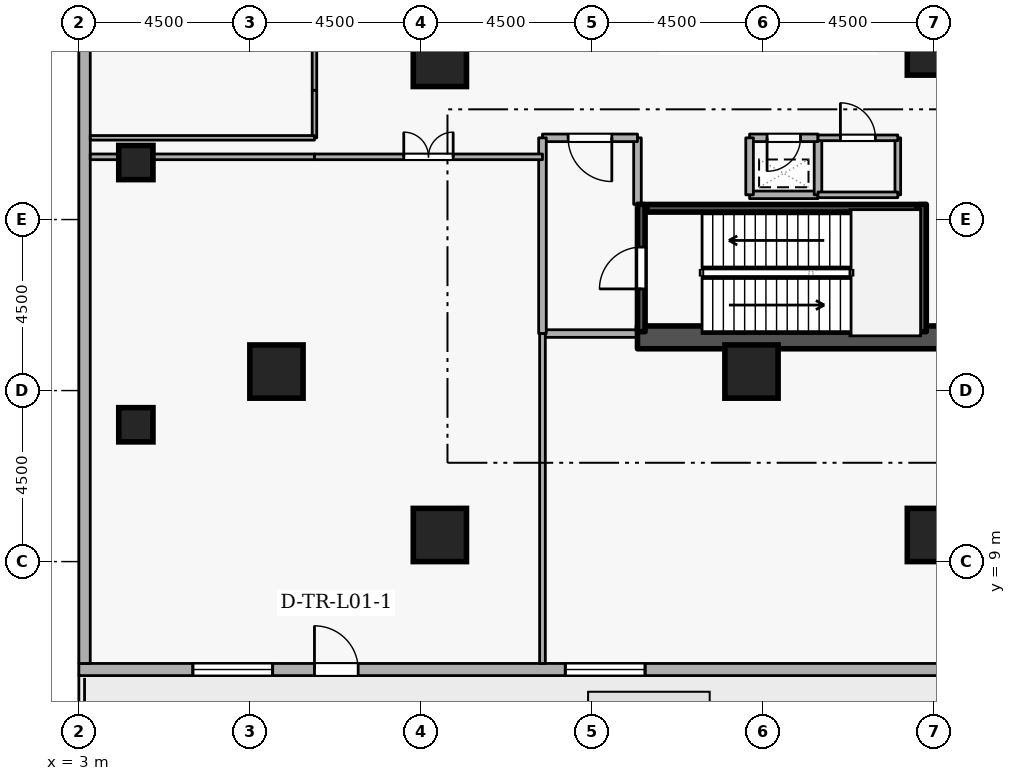
"""IFC4 building model, lengths in metres.
Left out: names, types, materials, properties, quantities, classifications, styles, units other than length and angle.
Written with IfcOpenShell. Run it as: python <this file> out.ifc"""

import sys

from ifc_helpers import new_model, si_unit, direction, frame, frame_2d, origin, origin_2d, place, context, subcontext, project, spatial, rectangle, extrude, element, fill, save


model = new_model("IFC4")
c1 = context("Model", 3, precision=1e-05, world=origin(), true_north=direction((0.0, 1.0)))
c2 = subcontext(c1, "Body", "Model", "MODEL_VIEW")
j1 = project(units=[si_unit("LENGTHUNIT", "METRE"), si_unit("PLANEANGLEUNIT", "RADIAN")], contexts=[c1])
p1 = place(None, origin())
s1 = spatial("IfcSite", under=j1, at=p1, CompositionType="ELEMENT")
p2 = place(p1, origin())
s2 = spatial("IfcBuilding", under=s1, at=p2, CompositionType="ELEMENT")
p3 = place(p2, frame((0.0, 0.0, 4.8)))
s3 = spatial("IfcBuildingStorey", under=s2, at=p3, CompositionType="ELEMENT", Elevation=4.8)
p4 = place(p3, frame((17.7, 14.9, 0.0), z_axis=(0.0, 0.0, 1.0), x_axis=(1.0, 0.0, 0.0)))
e1 = element("IfcWall", 1, at=p4, inside=s3, PredefinedType="SHEAR", context=c2, shape_type="SweptSolid", body=[
    extrude(rectangle(XDim=15.6, YDim=0.6, at=frame_2d((7.8, 0.0))), origin(), (0.0, 0.0, 1.0), 4.8),
])
for number, where, z_axis, x_axis in (
    (2, (12.5, 9.7, 0.0), (0.0, 0.0, 1.0), (1.0, 0.0, 0.0)),
    (3, (25.5, 9.7, 0.0), (0.0, 0.0, 1.0), (1.0, 0.0, 0.0)),
    (4, (8.2, 14.0, 0.0), (0.0, 0.0, 1.0), (1.0, 0.0, 0.0)),
    (5, (12.5, 22.2, 0.0), (0.0, 0.0, 1.0), (1.0, 0.0, 0.0)),
    (6, (20.7, 14.0, 0.0), (0.0, 0.0, 1.0), (1.0, 0.0, 0.0)),
    (7, (25.5, 22.5, 0.0), (0.0, 0.0, 1.0), (1.0, 0.0, 0.0)),
):
    element("IfcColumn", number, at=place(p3, frame(where, z_axis=z_axis, x_axis=x_axis)), inside=s3, PredefinedType="COLUMN", context=c2, shape_type="SweptSolid", body=[
        extrude(rectangle(XDim=1.4, YDim=1.4, at=origin_2d()), origin(), (0.0, 0.0, 1.0), 4.8),
    ])
for number, where, z_axis, x_axis in (
    (8, (4.5, 12.6, 0.0), (0.0, 0.0, 1.0), (1.0, 0.0, 0.0)),
    (9, (4.5, 19.5, 0.0), (0.0, 0.0, 1.0), (1.0, 0.0, 0.0)),
):
    element("IfcColumn", number, at=place(p3, frame(where, z_axis=z_axis, x_axis=x_axis)), inside=s3, PredefinedType="COLUMN", context=c2, shape_type="SweptSolid", body=[
        extrude(rectangle(XDim=0.9, YDim=0.9, at=origin_2d()), origin(), (0.0, 0.0, 1.0), 4.8),
    ])
p5 = place(p3, frame((3.0, 6.16, 0.0), z_axis=(0.0, 0.0, 1.0), x_axis=(1.0, 0.0, 0.0)))
e10 = element("IfcWall", 10, at=p5, inside=s3, PredefinedType="STANDARD", context=c2, shape_type="SweptSolid", body=[
    extrude(rectangle(XDim=39.4, YDim=0.32, at=frame_2d((19.7, 0.0))), origin(), (0.0, 0.0, 1.0), 3.86),
])
p6 = place(p5, frame((6.2, 0.0, 0.0)))
e11 = element("IfcOpeningElement", 11, at=p6, cuts=e10, PredefinedType="OPENING", context=c2, shape_type="SweptSolid", body=[
    extrude(rectangle(XDim=1.15, YDim=2.1, at=frame_2d((0.575, 1.05))), frame((0.0, 0.17, 0.0), z_axis=(0.0, -1.0, 0.0), x_axis=(1.0, 0.0, 0.0)), (0.0, 0.0, 1.0), 0.34),
])
p7 = place(p5, frame((3.0, 0.0, 0.78)))
e12 = element("IfcOpeningElement", 12, at=p7, cuts=e10, PredefinedType="OPENING", context=c2, shape_type="SweptSolid", body=[
    extrude(rectangle(XDim=2.1, YDim=2.4, at=frame_2d((1.05, 1.2))), frame((0.0, 0.17, 0.0), z_axis=(0.0, -1.0, 0.0), x_axis=(1.0, 0.0, 0.0)), (0.0, 0.0, 1.0), 0.34),
])
p8 = place(p5, frame((12.8, 0.0, 0.78)))
e13 = element("IfcOpeningElement", 13, at=p8, cuts=e10, PredefinedType="OPENING", context=c2, shape_type="SweptSolid", body=[
    extrude(rectangle(XDim=2.1, YDim=2.4, at=frame_2d((1.05, 1.2))), frame((0.0, 0.17, 0.0), z_axis=(0.0, -1.0, 0.0), x_axis=(1.0, 0.0, 0.0)), (0.0, 0.0, 1.0), 0.34),
])
p9 = place(p5, frame((22.8, 0.0, 0.78)))
e14 = element("IfcOpeningElement", 14, at=p9, cuts=e10, PredefinedType="OPENING", context=c2, shape_type="SweptSolid", body=[
    extrude(rectangle(XDim=2.1, YDim=2.4, at=frame_2d((1.05, 1.2))), frame((0.0, 0.17, 0.0), z_axis=(0.0, -1.0, 0.0), x_axis=(1.0, 0.0, 0.0)), (0.0, 0.0, 1.0), 0.34),
])
p10 = place(p5, frame((32.8, 0.0, 0.78)))
e15 = element("IfcOpeningElement", 15, at=p10, cuts=e10, PredefinedType="OPENING", context=c2, shape_type="SweptSolid", body=[
    extrude(rectangle(XDim=2.1, YDim=2.4, at=frame_2d((1.05, 1.2))), frame((0.0, 0.17, 0.0), z_axis=(0.0, -1.0, 0.0), x_axis=(1.0, 0.0, 0.0)), (0.0, 0.0, 1.0), 0.34),
])
p11 = place(p3, frame((3.15, 49.18, 0.0), z_axis=(0.0, 0.0, 1.0), x_axis=(0.0, -1.0, 0.0)))
e16 = element("IfcWall", 16, at=p11, inside=s3, PredefinedType="STANDARD", context=c2, shape_type="SweptSolid", body=[
    extrude(rectangle(XDim=42.86, YDim=0.3, at=frame_2d((21.43, 0.0))), origin(), (0.0, 0.0, 1.0), 3.86),
])
p12 = place(p3, frame((17.8, 15.05, 0.0), z_axis=(0.0, 0.0, 1.0), x_axis=(0.0, 1.0, 0.0)))
e17 = element("IfcWall", 17, at=p12, inside=s3, PredefinedType="SHEAR", context=c2, shape_type="SweptSolid", body=[
    extrude(rectangle(XDim=3.35, YDim=0.2, at=frame_2d((1.675, 0.0))), origin(), (0.0, 0.0, 1.0), 4.8),
])
p13 = place(p12, frame((1.125, 0.0, 0.0)))
e18 = element("IfcOpeningElement", 18, at=p13, cuts=e17, PredefinedType="OPENING", context=c2, shape_type="SweptSolid", body=[
    extrude(rectangle(XDim=1.1, YDim=2.1, at=frame_2d((0.55, 1.05))), frame((0.0, 0.11, 0.0), z_axis=(0.0, -1.0, 0.0), x_axis=(1.0, 0.0, 0.0)), (0.0, 0.0, 1.0), 0.22),
])
p14 = place(p3, frame((25.2, 18.4, 0.0), z_axis=(0.0, 0.0, 1.0), x_axis=(0.0, -1.0, 0.0)))
e19 = element("IfcWall", 19, at=p14, inside=s3, PredefinedType="SHEAR", context=c2, shape_type="SweptSolid", body=[
    extrude(rectangle(XDim=3.35, YDim=0.2, at=frame_2d((1.675, 0.0))), origin(), (0.0, 0.0, 1.0), 4.8),
])
p15 = place(p3, frame((25.05, 18.297, 0.0), z_axis=(0.0, 0.0, 1.0), x_axis=(-1.0, 0.0, 0.0)))
e20 = element("IfcWall", 20, at=p15, inside=s3, PredefinedType="SHEAR", context=c2, shape_type="SweptSolid", body=[
    extrude(rectangle(XDim=7.1, YDim=0.2, at=frame_2d((3.55, 0.0))), origin(), (0.0, 0.0, 1.0), 4.8),
])
p16 = place(p3, frame((15.2, 15.0, 0.0), z_axis=(0.0, 0.0, 1.0), x_axis=(1.0, 0.0, 0.0)))
e21 = element("IfcWall", 21, at=p16, inside=s3, PredefinedType="STANDARD", context=c2, shape_type="SweptSolid", body=[
    extrude(rectangle(XDim=2.5, YDim=0.2, at=frame_2d((1.25, 0.0))), origin(), (0.0, 0.0, 1.0), 4.46),
])
p17 = place(p3, frame((17.7, 18.4, 0.0), z_axis=(0.0, 0.0, 1.0), x_axis=(0.0, 1.0, 0.0)))
e22 = element("IfcWall", 22, at=p17, inside=s3, PredefinedType="STANDARD", context=c2, shape_type="SweptSolid", body=[
    extrude(rectangle(XDim=1.75, YDim=0.2, at=frame_2d((0.875, 0.0))), origin(), (0.0, 0.0, 1.0), 3.665),
])
p18 = place(p3, frame((17.7, 20.15, 0.0), z_axis=(0.0, 0.0, 1.0), x_axis=(-1.0, 0.0, 0.0)))
e23 = element("IfcWall", 23, at=p18, inside=s3, PredefinedType="STANDARD", context=c2, shape_type="SweptSolid", body=[
    extrude(rectangle(XDim=2.5, YDim=0.2, at=frame_2d((1.25, 0.0))), origin(), (0.0, 0.0, 1.0), 4.46),
])
p19 = place(p18, frame((0.675, 0.0, 0.0)))
e24 = element("IfcOpeningElement", 24, at=p19, cuts=e23, PredefinedType="OPENING", context=c2, shape_type="SweptSolid", body=[
    extrude(rectangle(XDim=1.15, YDim=2.1, at=frame_2d((0.575, 1.05))), frame((0.0, 0.11, 0.0), z_axis=(0.0, -1.0, 0.0), x_axis=(1.0, 0.0, 0.0)), (0.0, 0.0, 1.0), 0.22),
])
p20 = place(p3, frame((15.2, 20.15, 0.0), z_axis=(0.0, 0.0, 1.0), x_axis=(0.0, -1.0, 0.0)))
e25 = element("IfcWall", 25, at=p20, inside=s3, PredefinedType="STANDARD", context=c2, shape_type="SweptSolid", body=[
    extrude(rectangle(XDim=5.15, YDim=0.2, at=frame_2d((2.575, 0.0))), origin(), (0.0, 0.0, 1.0), 4.46),
])
p21 = place(p3, frame((20.65, 18.65, 0.0), z_axis=(0.0, 0.0, 1.0), x_axis=(1.0, 0.0, 0.0)))
e26 = element("IfcWall", 26, at=p21, inside=s3, PredefinedType="STANDARD", context=c2, shape_type="SweptSolid", body=[
    extrude(rectangle(XDim=1.8, YDim=0.2, at=frame_2d((0.9, 0.0))), origin(), (0.0, 0.0, 1.0), 4.46),
])
p22 = place(p3, frame((22.45, 18.65, 0.0), z_axis=(0.0, 0.0, 1.0), x_axis=(0.0, 1.0, 0.0)))
e27 = element("IfcWall", 27, at=p22, inside=s3, PredefinedType="STANDARD", context=c2, shape_type="SweptSolid", body=[
    extrude(rectangle(XDim=1.5, YDim=0.2, at=frame_2d((0.75, 0.0))), origin(), (0.0, 0.0, 1.0), 4.46),
])
p23 = place(p3, frame((22.45, 20.15, 0.0), z_axis=(0.0, 0.0, 1.0), x_axis=(-1.0, 0.0, 0.0)))
e28 = element("IfcWall", 28, at=p23, inside=s3, PredefinedType="STANDARD", context=c2, shape_type="SweptSolid", body=[
    extrude(rectangle(XDim=1.8, YDim=0.2, at=frame_2d((0.9, 0.0))), origin(), (0.0, 0.0, 1.0), 4.46),
])
p24 = place(p23, frame((0.46, 0.0, 0.0)))
e29 = element("IfcOpeningElement", 29, at=p24, cuts=e28, PredefinedType="OPENING", context=c2, shape_type="SweptSolid", body=[
    extrude(rectangle(XDim=0.88, YDim=2.04, at=frame_2d((0.44, 1.02))), frame((0.0, 0.11, 0.0), z_axis=(0.0, -1.0, 0.0), x_axis=(1.0, 0.0, 0.0)), (0.0, 0.0, 1.0), 0.22),
])
p25 = place(p3, frame((20.65, 20.15, 0.0), z_axis=(0.0, 0.0, 1.0), x_axis=(0.0, -1.0, 0.0)))
e30 = element("IfcWall", 30, at=p25, inside=s3, PredefinedType="STANDARD", context=c2, shape_type="SweptSolid", body=[
    extrude(rectangle(XDim=1.5, YDim=0.2, at=frame_2d((0.75, 0.0))), origin(), (0.0, 0.0, 1.0), 4.46),
])
p26 = place(p3, frame((24.55, 20.15, 0.0), z_axis=(0.0, 0.0, 1.0), x_axis=(0.0, -1.0, 0.0)))
e31 = element("IfcWall", 31, at=p26, inside=s3, PredefinedType="PARTITIONING", context=c2, shape_type="SweptSolid", body=[
    extrude(rectangle(XDim=1.5, YDim=0.15, at=frame_2d((0.75, 0.0))), origin(), (0.0, 0.0, 1.0), 4.46),
])
p27 = place(p3, frame((24.55, 18.65, 0.0), z_axis=(0.0, 0.0, 1.0), x_axis=(-1.0, 0.0, 0.0)))
e32 = element("IfcWall", 32, at=p27, inside=s3, PredefinedType="PARTITIONING", context=c2, shape_type="SweptSolid", body=[
    extrude(rectangle(XDim=2.1, YDim=0.15, at=frame_2d((1.05, 0.0))), origin(), (0.0, 0.0, 1.0), 4.46),
])
p28 = place(p3, frame((22.45, 20.15, 0.0), z_axis=(0.0, 0.0, 1.0), x_axis=(1.0, 0.0, 0.0)))
e33 = element("IfcWall", 33, at=p28, inside=s3, PredefinedType="PARTITIONING", context=c2, shape_type="SweptSolid", body=[
    extrude(rectangle(XDim=2.1, YDim=0.15, at=frame_2d((1.05, 0.0))), origin(), (0.0, 0.0, 1.0), 4.46),
])
p29 = place(p28, frame((0.59, 0.0, 0.0)))
e34 = element("IfcOpeningElement", 34, at=p29, cuts=e33, PredefinedType="OPENING", context=c2, shape_type="SweptSolid", body=[
    extrude(rectangle(XDim=0.92, YDim=2.08, at=frame_2d((0.46, 1.04))), frame((0.0, 0.085, 0.0), z_axis=(0.0, -1.0, 0.0), x_axis=(1.0, 0.0, 0.0)), (0.0, 0.0, 1.0), 0.17),
])
p30 = place(p3, frame((3.3, 19.65, 0.0), z_axis=(0.0, 0.0, 1.0), x_axis=(1.0, 0.0, 0.0)))
e35 = element("IfcWall", 35, at=p30, inside=s3, PredefinedType="PARTITIONING", context=c2, shape_type="SweptSolid", body=[
    extrude(rectangle(XDim=5.9, YDim=0.15, at=frame_2d((2.95, 0.0))), origin(), (0.0, 0.0, 1.0), 4.46),
])
p31 = place(p3, frame((9.2, 19.65, 0.0), z_axis=(0.0, 0.0, 1.0), x_axis=(1.0, 0.0, 0.0)))
e36 = element("IfcWall", 36, at=p31, inside=s3, PredefinedType="PARTITIONING", context=c2, shape_type="SweptSolid", body=[
    extrude(rectangle(XDim=6.0, YDim=0.15, at=frame_2d((3.0, 0.0))), origin(), (0.0, 0.0, 1.0), 4.46),
])
p32 = place(p31, frame((2.35, 0.0, 0.0)))
e37 = element("IfcOpeningElement", 37, at=p32, cuts=e36, PredefinedType="OPENING", context=c2, shape_type="SweptSolid", body=[
    extrude(rectangle(XDim=1.3, YDim=2.12, at=frame_2d((0.65, 1.06))), frame((0.0, 0.085, 0.0), z_axis=(0.0, -1.0, 0.0), x_axis=(1.0, 0.0, 0.0)), (0.0, 0.0, 1.0), 0.17),
])
p33 = place(p3, frame((15.2, 15.0, 0.0), z_axis=(0.0, 0.0, 1.0), x_axis=(0.0, -1.0, 0.0)))
e38 = element("IfcWall", 38, at=p33, inside=s3, PredefinedType="PARTITIONING", context=c2, shape_type="SweptSolid", body=[
    extrude(rectangle(XDim=8.68, YDim=0.15, at=frame_2d((4.34, 0.0))), origin(), (0.0, 0.0, 1.0), 4.46),
])
p34 = place(p3, frame((9.2, 33.85, 0.0), z_axis=(0.0, 0.0, 1.0), x_axis=(0.0, -1.0, 0.0)))
e39 = element("IfcWall", 39, at=p34, inside=s3, PredefinedType="PARTITIONING", context=c2, shape_type="SweptSolid", body=[
    extrude(rectangle(XDim=12.45, YDim=0.12, at=frame_2d((6.225, 0.0))), origin(), (0.0, 0.0, 1.0), 4.46),
])
p35 = place(p34, frame((4.82, 0.0, 0.0)))
e40 = element("IfcOpeningElement", 40, at=p35, cuts=e39, PredefinedType="OPENING", context=c2, shape_type="SweptSolid", body=[
    extrude(rectangle(XDim=1.05, YDim=2.1, at=frame_2d((0.525, 1.05))), frame((0.0, 0.07, 0.0), z_axis=(0.0, -1.0, 0.0), x_axis=(1.0, 0.0, 0.0)), (0.0, 0.0, 1.0), 0.14),
])
p36 = place(p3, frame((9.2, 21.4, 0.0), z_axis=(0.0, 0.0, 1.0), x_axis=(0.0, -1.0, 0.0)))
e41 = element("IfcWall", 41, at=p36, inside=s3, PredefinedType="PARTITIONING", context=c2, shape_type="SweptSolid", body=[
    extrude(rectangle(XDim=1.25, YDim=0.12, at=frame_2d((0.625, 0.0))), origin(), (0.0, 0.0, 1.0), 4.46),
])
p37 = place(p3, frame((9.2, 20.15, 0.0), z_axis=(0.0, 0.0, 1.0), x_axis=(-1.0, 0.0, 0.0)))
e42 = element("IfcWall", 42, at=p37, inside=s3, PredefinedType="PARTITIONING", context=c2, shape_type="SweptSolid", body=[
    extrude(rectangle(XDim=5.9, YDim=0.12, at=frame_2d((2.95, 0.0))), origin(), (0.0, 0.0, 1.0), 4.46),
])
p38 = place(p6, origin())
e43 = element("IfcDoor", 43, at=p38, inside=s3, OperationType="SINGLE_SWING_LEFT", PredefinedType="DOOR", context=c2, shape_type="SweptSolid", body=[
    extrude(rectangle(XDim=1.15, YDim=2.1, at=frame_2d((0.575, 1.05))), frame((0.0, 0.025, 0.0), z_axis=(0.0, -1.0, 0.0), x_axis=(1.0, 0.0, 0.0)), (0.0, 0.0, 1.0), 0.05),
])
fill(e11, e43)
p39 = place(p7, origin())
e44 = element("IfcWindow", 44, at=p39, inside=s3, PartitioningType="SINGLE_PANEL", PredefinedType="WINDOW", context=c2, shape_type="SweptSolid", body=[
    extrude(rectangle(XDim=2.1, YDim=2.4, at=frame_2d((1.05, 1.2))), frame((0.0, 0.03, 0.0), z_axis=(0.0, -1.0, 0.0), x_axis=(1.0, 0.0, 0.0)), (0.0, 0.0, 1.0), 0.06),
])
fill(e12, e44)
p40 = place(p8, origin())
e45 = element("IfcWindow", 45, at=p40, inside=s3, PartitioningType="SINGLE_PANEL", PredefinedType="WINDOW", context=c2, shape_type="SweptSolid", body=[
    extrude(rectangle(XDim=2.1, YDim=2.4, at=frame_2d((1.05, 1.2))), frame((0.0, 0.03, 0.0), z_axis=(0.0, -1.0, 0.0), x_axis=(1.0, 0.0, 0.0)), (0.0, 0.0, 1.0), 0.06),
])
fill(e13, e45)
p41 = place(p13, origin())
e46 = element("IfcDoor", 46, at=p41, inside=s3, OperationType="SINGLE_SWING_LEFT", PredefinedType="DOOR", context=c2, shape_type="SweptSolid", body=[
    extrude(rectangle(XDim=1.1, YDim=2.1, at=frame_2d((0.55, 1.05))), frame((0.0, 0.025, 0.0), z_axis=(0.0, -1.0, 0.0), x_axis=(1.0, 0.0, 0.0)), (0.0, 0.0, 1.0), 0.05),
])
fill(e18, e46)
p42 = place(p19, origin())
e47 = element("IfcDoor", 47, at=p42, inside=s3, OperationType="SINGLE_SWING_LEFT", PredefinedType="DOOR", context=c2, shape_type="SweptSolid", body=[
    extrude(rectangle(XDim=1.15, YDim=2.1, at=frame_2d((0.575, 1.05))), frame((0.0, 0.025, 0.0), z_axis=(0.0, -1.0, 0.0), x_axis=(1.0, 0.0, 0.0)), (0.0, 0.0, 1.0), 0.05),
])
fill(e24, e47)
p43 = place(p24, origin())
e48 = element("IfcDoor", 48, at=p43, inside=s3, OperationType="SINGLE_SWING_RIGHT", PredefinedType="DOOR", context=c2, shape_type="SweptSolid", body=[
    extrude(rectangle(XDim=0.88, YDim=2.04, at=frame_2d((0.44, 1.02))), frame((0.0, 0.025, 0.0), z_axis=(0.0, -1.0, 0.0), x_axis=(1.0, 0.0, 0.0)), (0.0, 0.0, 1.0), 0.05),
])
fill(e29, e48)
p44 = place(p29, origin())
e49 = element("IfcDoor", 49, at=p44, inside=s3, OperationType="SINGLE_SWING_LEFT", PredefinedType="DOOR", context=c2, shape_type="SweptSolid", body=[
    extrude(rectangle(XDim=0.92, YDim=2.08, at=frame_2d((0.46, 1.04))), frame((0.0, 0.025, 0.0), z_axis=(0.0, -1.0, 0.0), x_axis=(1.0, 0.0, 0.0)), (0.0, 0.0, 1.0), 0.05),
])
fill(e34, e49)
p45 = place(p32, origin())
e50 = element("IfcDoor", 50, at=p45, inside=s3, OperationType="DOUBLE_DOOR_SINGLE_SWING", PredefinedType="DOOR", context=c2, shape_type="SweptSolid", body=[
    extrude(rectangle(XDim=1.3, YDim=2.12, at=frame_2d((0.65, 1.06))), frame((0.0, 0.025, 0.0), z_axis=(0.0, -1.0, 0.0), x_axis=(1.0, 0.0, 0.0)), (0.0, 0.0, 1.0), 0.05),
])
fill(e37, e50)
save(model, sys.argv[1])
